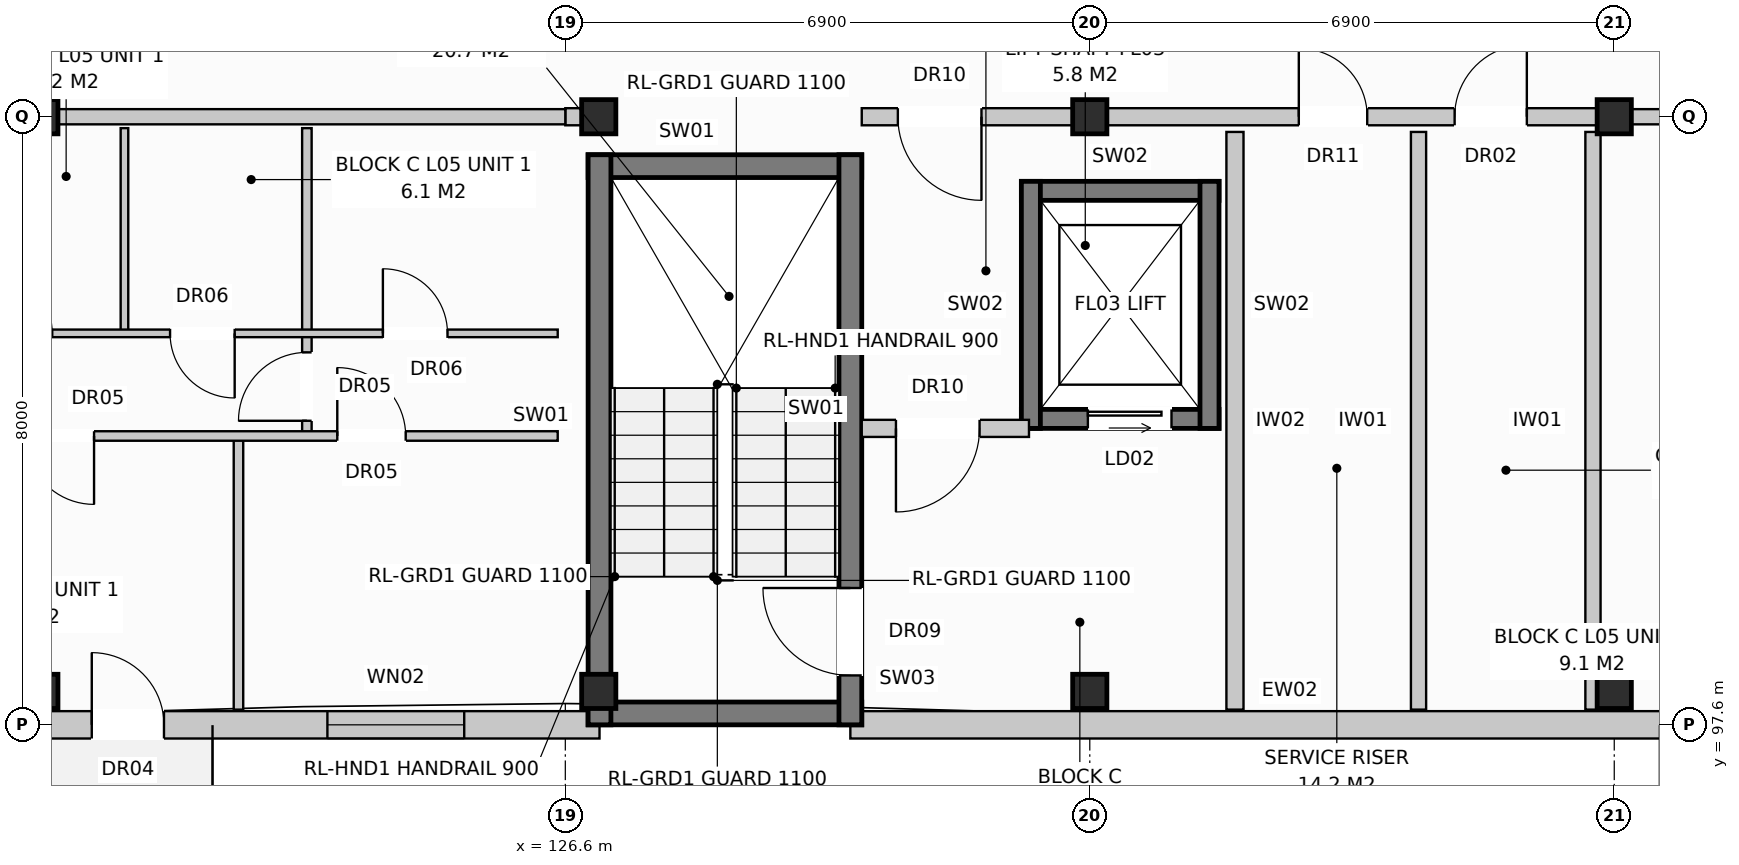
"""IFC4 building model, lengths in metres.
Left out: names, types, materials, properties, quantities, classifications, styles, units other than length and angle.
Written with IfcOpenShell. Run it as: python <this file> out.ifc"""

import sys

from ifc_helpers import new_model, si_unit, direction, frame, frame_2d, origin, origin_with_axes, origin_2d, place, context, subcontext, project, spatial, rectangle, extrude, element, fill, save


model = new_model("IFC4")
c1 = context("Model", 3, precision=1e-05, world=origin(), true_north=direction((0.0, 1.0)))
c2 = subcontext(c1, "Body", "Model", "MODEL_VIEW")
j1 = project(units=[si_unit("LENGTHUNIT", "METRE"), si_unit("PLANEANGLEUNIT", "RADIAN")], contexts=[c1])
p1 = place(None, origin())
s1 = spatial("IfcSite", under=j1, at=p1, CompositionType="ELEMENT")
p2 = place(p1, origin())
s2 = spatial("IfcBuilding", under=s1, at=p2, CompositionType="ELEMENT")
p3 = place(p2, frame((0.0, 0.0, 17.6)))
s3 = spatial("IfcBuildingStorey", under=s2, at=p3, CompositionType="ELEMENT", Elevation=17.6)
for number, where, z_axis, x_axis in (
    (1, (119.7, 98.04, 0.0), (0.0, 0.0, 1.0), (1.0, 0.0, 0.0)),
    (2, (119.7, 105.6, 0.0), (0.0, 0.0, 1.0), (1.0, 0.0, 0.0)),
    (3, (127.04, 98.04, 0.0), (0.0, 0.0, 1.0), (1.0, 0.0, 0.0)),
    (4, (127.04, 105.6, 0.0), (0.0, 0.0, 1.0), (1.0, 0.0, 0.0)),
    (5, (133.5, 98.04, 0.0), (0.0, 0.0, 1.0), (1.0, 0.0, 0.0)),
    (6, (133.5, 105.6, 0.0), (0.0, 0.0, 1.0), (1.0, 0.0, 0.0)),
    (7, (140.4, 98.04, 0.0), (0.0, 0.0, 1.0), (1.0, 0.0, 0.0)),
    (8, (140.4, 105.6, 0.0), (0.0, 0.0, 1.0), (1.0, 0.0, 0.0)),
):
    element("IfcColumn", number, at=place(p3, frame(where, z_axis=z_axis, x_axis=x_axis)), inside=s3, PredefinedType="COLUMN", context=c2, shape_type="SweptSolid", body=[
        extrude(rectangle(XDim=0.45, YDim=0.45, at=origin_2d()), origin(), (0.0, 0.0, 1.0), 3.2),
    ])
p4 = place(p3, frame((112.97, 97.6, 0.0), z_axis=(0.0, 0.0, 1.0), x_axis=(1.0, 0.0, 0.0)))
e9 = element("IfcWall", 9, at=p4, inside=s3, PredefinedType="STANDARD", context=c2, shape_type="SweptSolid", body=[
    extrude(rectangle(XDim=14.08, YDim=0.36, at=frame_2d((7.04, 0.0))), origin(), (0.0, 0.0, 1.0), 2.95),
])
p5 = place(p4, frame((7.4, 0.0, 0.0)))
e10 = element("IfcOpeningElement", 10, at=p5, cuts=e9, PredefinedType="OPENING", context=c2, shape_type="SweptSolid", body=[
    extrude(rectangle(XDim=0.95, YDim=2.1, at=frame_2d((0.475, 1.05))), frame((0.0, 0.192, 0.0), z_axis=(0.0, -1.0, 0.0), x_axis=(1.0, 0.0, 0.0)), (0.0, 0.0, 1.0), 0.384),
])
p6 = place(p4, frame((1.525, 0.0, 0.8)))
e11 = element("IfcOpeningElement", 11, at=p6, cuts=e9, PredefinedType="OPENING", context=c2, shape_type="SweptSolid", body=[
    extrude(rectangle(XDim=1.95, YDim=1.65, at=frame_2d((0.975, 0.825))), frame((0.0, 0.192, 0.0), z_axis=(0.0, -1.0, 0.0), x_axis=(1.0, 0.0, 0.0)), (0.0, 0.0, 1.0), 0.384),
])
p7 = place(p4, frame((10.5, 0.0, 0.8)))
e12 = element("IfcOpeningElement", 12, at=p7, cuts=e9, PredefinedType="OPENING", context=c2, shape_type="SweptSolid", body=[
    extrude(rectangle(XDim=1.8, YDim=1.7, at=frame_2d((0.9, 0.85))), frame((0.0, 0.192, 0.0), z_axis=(0.0, -1.0, 0.0), x_axis=(1.0, 0.0, 0.0)), (0.0, 0.0, 1.0), 0.384),
])
p8 = place(p3, frame((130.35, 97.6, 0.0), z_axis=(0.0, 0.0, 1.0), x_axis=(1.0, 0.0, 0.0)))
e13 = element("IfcWall", 13, at=p8, inside=s3, PredefinedType="STANDARD", context=c2, shape_type="SweptSolid", body=[
    extrude(rectangle(XDim=17.4, YDim=0.36, at=frame_2d((8.7, 0.0))), origin(), (0.0, 0.0, 1.0), 2.95),
])
p9 = place(p8, frame((11.87, 0.0, 0.0)))
e14 = element("IfcOpeningElement", 14, at=p9, cuts=e13, PredefinedType="OPENING", context=c2, shape_type="SweptSolid", body=[
    extrude(rectangle(XDim=0.95, YDim=2.1, at=frame_2d((0.475, 1.05))), frame((0.0, 0.192, 0.0), z_axis=(0.0, -1.0, 0.0), x_axis=(1.0, 0.0, 0.0)), (0.0, 0.0, 1.0), 0.384),
])
p10 = place(p8, frame((14.87, 0.0, 0.72)))
e15 = element("IfcOpeningElement", 15, at=p10, cuts=e13, PredefinedType="OPENING", context=c2, shape_type="SweptSolid", body=[
    extrude(rectangle(XDim=1.1, YDim=1.5, at=frame_2d((0.55, 0.75))), frame((0.0, 0.192, 0.0), z_axis=(0.0, -1.0, 0.0), x_axis=(1.0, 0.0, 0.0)), (0.0, 0.0, 1.0), 0.384),
])
for number, where, z_axis, x_axis in (
    (16, (126.9, 97.75, 0.0), (0.0, 0.0, 1.0), (1.0, 0.0, 0.0)),
    (17, (126.9, 104.95, 0.0), (0.0, 0.0, 1.0), (1.0, 0.0, 0.0)),
):
    element("IfcWall", number, at=place(p3, frame(where, z_axis=z_axis, x_axis=x_axis)), inside=s3, PredefinedType="SHEAR", context=c2, shape_type="SweptSolid", body=[
        extrude(rectangle(XDim=3.6, YDim=0.3, at=frame_2d((1.8, 0.0))), origin(), (0.0, 0.0, 1.0), 2.95),
    ])
p11 = place(p3, frame((127.05, 97.6, 0.0), z_axis=(0.0, 0.0, 1.0), x_axis=(0.0, 1.0, 0.0)))
e18 = element("IfcWall", 18, at=p11, inside=s3, PredefinedType="SHEAR", context=c2, shape_type="SweptSolid", body=[
    extrude(rectangle(XDim=7.5, YDim=0.3, at=frame_2d((3.75, 0.0))), origin(), (0.0, 0.0, 1.0), 2.95),
])
p12 = place(p3, frame((130.35, 97.6, 0.0), z_axis=(0.0, 0.0, 1.0), x_axis=(0.0, 1.0, 0.0)))
e19 = element("IfcWall", 19, at=p12, inside=s3, PredefinedType="SHEAR", context=c2, shape_type="SweptSolid", body=[
    extrude(rectangle(XDim=7.5, YDim=0.3, at=frame_2d((3.75, 0.0))), origin(), (0.0, 0.0, 1.0), 2.95),
])
p13 = place(p12, frame((0.65, 0.0, 0.0)))
e20 = element("IfcOpeningElement", 20, at=p13, cuts=e19, PredefinedType="OPENING", context=c2, shape_type="SweptSolid", body=[
    extrude(rectangle(XDim=1.15, YDim=2.15, at=frame_2d((0.575, 1.075))), frame((0.0, 0.162, 0.0), z_axis=(0.0, -1.0, 0.0), x_axis=(1.0, 0.0, 0.0)), (0.0, 0.0, 1.0), 0.324),
])
p14 = place(p3, frame((132.6, 101.625, 0.0), z_axis=(0.0, 0.0, 1.0), x_axis=(1.0, 0.0, 0.0)))
e21 = element("IfcWall", 21, at=p14, inside=s3, PredefinedType="SHEAR", context=c2, shape_type="SweptSolid", body=[
    extrude(rectangle(XDim=2.6, YDim=0.25, at=frame_2d((1.3, 0.0))), origin(), (0.0, 0.0, 1.0), 2.95),
])
p15 = place(p14, frame((0.875, 0.0, 0.0)))
e22 = element("IfcOpeningElement", 22, at=p15, cuts=e21, PredefinedType="OPENING", context=c2, shape_type="SweptSolid", body=[
    extrude(rectangle(XDim=1.1, YDim=2.1, at=frame_2d((0.55, 1.05))), frame((0.0, 0.137, 0.0), z_axis=(0.0, -1.0, 0.0), x_axis=(1.0, 0.0, 0.0)), (0.0, 0.0, 1.0), 0.274),
])
p16 = place(p3, frame((132.6, 104.625, 0.0), z_axis=(0.0, 0.0, 1.0), x_axis=(1.0, 0.0, 0.0)))
e23 = element("IfcWall", 23, at=p16, inside=s3, PredefinedType="SHEAR", context=c2, shape_type="SweptSolid", body=[
    extrude(rectangle(XDim=2.6, YDim=0.25, at=frame_2d((1.3, 0.0))), origin(), (0.0, 0.0, 1.0), 2.95),
])
for number, where, z_axis, x_axis in (
    (24, (132.725, 101.5, 0.0), (0.0, 0.0, 1.0), (0.0, 1.0, 0.0)),
    (25, (135.075, 101.5, 0.0), (0.0, 0.0, 1.0), (0.0, 1.0, 0.0)),
):
    element("IfcWall", number, at=place(p3, frame(where, z_axis=z_axis, x_axis=x_axis)), inside=s3, PredefinedType="SHEAR", context=c2, shape_type="SweptSolid", body=[
        extrude(rectangle(XDim=3.25, YDim=0.25, at=frame_2d((1.625, 0.0))), origin(), (0.0, 0.0, 1.0), 2.95),
    ])
p17 = place(p3, frame((135.41, 97.8, 0.0), z_axis=(0.0, 0.0, 1.0), x_axis=(0.0, 1.0, 0.0)))
e26 = element("IfcWall", 26, at=p17, inside=s3, PredefinedType="PARTITIONING", context=c2, shape_type="SweptSolid", body=[
    extrude(rectangle(XDim=7.6, YDim=0.225, at=frame_2d((3.8, 0.0))), origin(), (0.0, 0.0, 1.0), 2.59),
])
p18 = place(p3, frame((130.5, 101.5, 0.0), z_axis=(0.0, 0.0, 1.0), x_axis=(1.0, 0.0, 0.0)))
e27 = element("IfcWall", 27, at=p18, inside=s3, PredefinedType="PARTITIONING", context=c2, shape_type="SweptSolid", body=[
    extrude(rectangle(XDim=2.2, YDim=0.225, at=frame_2d((1.1, 0.0))), origin(), (0.0, 0.0, 1.0), 2.95),
])
p19 = place(p18, frame((0.45, 0.0, 0.0)))
e28 = element("IfcOpeningElement", 28, at=p19, cuts=e27, PredefinedType="OPENING", context=c2, shape_type="SweptSolid", body=[
    extrude(rectangle(XDim=1.1, YDim=2.15, at=frame_2d((0.55, 1.075))), frame((0.0, 0.125, 0.0), z_axis=(0.0, -1.0, 0.0), x_axis=(1.0, 0.0, 0.0)), (0.0, 0.0, 1.0), 0.249),
])
p20 = place(p3, frame((126.6, 105.6, 0.0), z_axis=(0.0, 0.0, 1.0), x_axis=(1.0, 0.0, 0.0)))
e29 = element("IfcWall", 29, at=p20, inside=s3, PredefinedType="PARTITIONING", context=c2, shape_type="SweptSolid", body=[
    extrude(rectangle(XDim=0.3, YDim=0.225, at=frame_2d((0.15, 0.0))), origin(), (0.0, 0.0, 1.0), 2.95),
])
for number, where, z_axis, x_axis in (
    (30, (137.825, 97.8, 0.0), (0.0, 0.0, 1.0), (0.0, 1.0, 0.0)),
    (31, (140.12, 97.8, 0.0), (0.0, 0.0, 1.0), (0.0, 1.0, 0.0)),
):
    element("IfcWall", number, at=place(p3, frame(where, z_axis=z_axis, x_axis=x_axis)), inside=s3, PredefinedType="PARTITIONING", context=c2, shape_type="SweptSolid", body=[
        extrude(rectangle(XDim=7.6, YDim=0.2, at=frame_2d((3.8, 0.0))), origin(), (0.0, 0.0, 1.0), 2.95),
    ])
p21 = place(p3, frame((130.5, 105.6, 0.0), z_axis=(0.0, 0.0, 1.0), x_axis=(1.0, 0.0, 0.0)))
e32 = element("IfcWall", 32, at=p21, inside=s3, PredefinedType="PARTITIONING", context=c2, shape_type="SweptSolid", body=[
    extrude(rectangle(XDim=9.9, YDim=0.225, at=frame_2d((4.95, 0.0))), origin(), (0.0, 0.0, 1.0), 2.39),
])
p22 = place(p21, frame((0.475, 0.0, 0.0)))
e33 = element("IfcOpeningElement", 33, at=p22, cuts=e32, PredefinedType="OPENING", context=c2, shape_type="SweptSolid", body=[
    extrude(rectangle(XDim=1.1, YDim=2.15, at=frame_2d((0.55, 1.075))), frame((0.0, 0.125, 0.0), z_axis=(0.0, -1.0, 0.0), x_axis=(1.0, 0.0, 0.0)), (0.0, 0.0, 1.0), 0.249),
])
p23 = place(p21, frame((5.75, 0.0, 0.0)))
e34 = element("IfcOpeningElement", 34, at=p23, cuts=e32, PredefinedType="OPENING", context=c2, shape_type="SweptSolid", body=[
    extrude(rectangle(XDim=0.9, YDim=2.1, at=frame_2d((0.45, 1.05))), frame((0.0, 0.125, 0.0), z_axis=(0.0, -1.0, 0.0), x_axis=(1.0, 0.0, 0.0)), (0.0, 0.0, 1.0), 0.249),
])
p24 = place(p21, frame((7.8, 0.0, 0.0)))
e35 = element("IfcOpeningElement", 35, at=p24, cuts=e32, PredefinedType="OPENING", context=c2, shape_type="SweptSolid", body=[
    extrude(rectangle(XDim=0.95, YDim=2.15, at=frame_2d((0.475, 1.075))), frame((0.0, 0.125, 0.0), z_axis=(0.0, -1.0, 0.0), x_axis=(1.0, 0.0, 0.0)), (0.0, 0.0, 1.0), 0.249),
])
p25 = place(p3, frame((112.8, 105.6, 0.0), z_axis=(0.0, 0.0, 1.0), x_axis=(1.0, 0.0, 0.0)))
e36 = element("IfcWall", 36, at=p25, inside=s3, PredefinedType="PARTITIONING", context=c2, shape_type="SweptSolid", body=[
    extrude(rectangle(XDim=13.8, YDim=0.2, at=frame_2d((6.9, 0.0))), origin(), (0.0, 0.0, 1.0), 2.39),
])
p26 = place(p25, frame((2.4, 0.0, 0.0)))
e37 = element("IfcOpeningElement", 37, at=p26, cuts=e36, PredefinedType="OPENING", context=c2, shape_type="SweptSolid", body=[
    extrude(rectangle(XDim=0.95, YDim=2.15, at=frame_2d((0.475, 1.075))), frame((0.0, 0.112, 0.0), z_axis=(0.0, -1.0, 0.0), x_axis=(1.0, 0.0, 0.0)), (0.0, 0.0, 1.0), 0.224),
])
p27 = place(p3, frame((120.8, 105.45, 0.0), z_axis=(0.0, 0.0, 1.0), x_axis=(0.0, -1.0, 0.0)))
e38 = element("IfcWall", 38, at=p27, inside=s3, PredefinedType="PARTITIONING", context=c2, shape_type="SweptSolid", body=[
    extrude(rectangle(XDim=2.7, YDim=0.1, at=frame_2d((1.35, 0.0))), origin(), (0.0, 0.0, 1.0), 2.59),
])
p28 = place(p3, frame((123.2, 105.45, 0.0), z_axis=(0.0, 0.0, 1.0), x_axis=(0.0, -1.0, 0.0)))
e39 = element("IfcWall", 39, at=p28, inside=s3, PredefinedType="PARTITIONING", context=c2, shape_type="SweptSolid", body=[
    extrude(rectangle(XDim=4.05, YDim=0.125, at=frame_2d((2.025, 0.0))), origin(), (0.0, 0.0, 1.0), 2.95),
])
p29 = place(p28, frame((2.95, 0.0, 0.0)))
e40 = element("IfcOpeningElement", 40, at=p29, cuts=e39, PredefinedType="OPENING", context=c2, shape_type="SweptSolid", body=[
    extrude(rectangle(XDim=0.9, YDim=2.1, at=frame_2d((0.45, 1.05))), frame((0.0, 0.074, 0.0), z_axis=(0.0, -1.0, 0.0), x_axis=(1.0, 0.0, 0.0)), (0.0, 0.0, 1.0), 0.149),
])
p30 = place(p3, frame((122.3, 101.4, 0.0), z_axis=(0.0, 0.0, 1.0), x_axis=(0.0, -1.0, 0.0)))
e41 = element("IfcWall", 41, at=p30, inside=s3, PredefinedType="PARTITIONING", context=c2, shape_type="SweptSolid", body=[
    extrude(rectangle(XDim=3.6, YDim=0.125, at=frame_2d((1.8, 0.0))), origin(), (0.0, 0.0, 1.0), 2.95),
])
p31 = place(p3, frame((118.0, 102.75, 0.0), z_axis=(0.0, 0.0, 1.0), x_axis=(1.0, 0.0, 0.0)))
e42 = element("IfcWall", 42, at=p31, inside=s3, PredefinedType="PARTITIONING", context=c2, shape_type="SweptSolid", body=[
    extrude(rectangle(XDim=8.5, YDim=0.1, at=frame_2d((4.25, 0.0))), origin(), (0.0, 0.0, 1.0), 2.95),
])
p32 = place(p31, frame((1.0, 0.0, 0.0)))
e43 = element("IfcOpeningElement", 43, at=p32, cuts=e42, PredefinedType="OPENING", context=c2, shape_type="SweptSolid", body=[
    extrude(rectangle(XDim=0.85, YDim=2.1, at=frame_2d((0.425, 1.05))), frame((0.0, 0.062, 0.0), z_axis=(0.0, -1.0, 0.0), x_axis=(1.0, 0.0, 0.0)), (0.0, 0.0, 1.0), 0.124),
])
p33 = place(p31, frame((3.4, 0.0, 0.0)))
e44 = element("IfcOpeningElement", 44, at=p33, cuts=e42, PredefinedType="OPENING", context=c2, shape_type="SweptSolid", body=[
    extrude(rectangle(XDim=0.85, YDim=2.05, at=frame_2d((0.425, 1.025))), frame((0.0, 0.062, 0.0), z_axis=(0.0, -1.0, 0.0), x_axis=(1.0, 0.0, 0.0)), (0.0, 0.0, 1.0), 0.124),
])
p34 = place(p31, frame((6.2, 0.0, 0.0)))
e45 = element("IfcOpeningElement", 45, at=p34, cuts=e42, PredefinedType="OPENING", context=c2, shape_type="SweptSolid", body=[
    extrude(rectangle(XDim=0.85, YDim=2.05, at=frame_2d((0.425, 1.025))), frame((0.0, 0.062, 0.0), z_axis=(0.0, -1.0, 0.0), x_axis=(1.0, 0.0, 0.0)), (0.0, 0.0, 1.0), 0.124),
])
p35 = place(p3, frame((118.0, 101.4, 0.0), z_axis=(0.0, 0.0, 1.0), x_axis=(1.0, 0.0, 0.0)))
e46 = element("IfcWall", 46, at=p35, inside=s3, PredefinedType="PARTITIONING", context=c2, shape_type="SweptSolid", body=[
    extrude(rectangle(XDim=8.5, YDim=0.125, at=frame_2d((4.25, 0.0))), origin(), (0.0, 0.0, 1.0), 2.95),
])
p36 = place(p35, frame((1.5, 0.0, 0.0)))
e47 = element("IfcOpeningElement", 47, at=p36, cuts=e46, PredefinedType="OPENING", context=c2, shape_type="SweptSolid", body=[
    extrude(rectangle(XDim=0.9, YDim=2.1, at=frame_2d((0.45, 1.05))), frame((0.0, 0.074, 0.0), z_axis=(0.0, -1.0, 0.0), x_axis=(1.0, 0.0, 0.0)), (0.0, 0.0, 1.0), 0.149),
])
p37 = place(p35, frame((5.6, 0.0, 0.0)))
e48 = element("IfcOpeningElement", 48, at=p37, cuts=e46, PredefinedType="OPENING", context=c2, shape_type="SweptSolid", body=[
    extrude(rectangle(XDim=0.9, YDim=2.1, at=frame_2d((0.45, 1.05))), frame((0.0, 0.074, 0.0), z_axis=(0.0, -1.0, 0.0), x_axis=(1.0, 0.0, 0.0)), (0.0, 0.0, 1.0), 0.149),
])
p38 = place(p3, frame((140.4, 105.6, 0.0), z_axis=(0.0, 0.0, 1.0), x_axis=(1.0, 0.0, 0.0)))
e49 = element("IfcWall", 49, at=p38, inside=s3, PredefinedType="PARTITIONING", context=c2, shape_type="SweptSolid", body=[
    extrude(rectangle(XDim=6.9, YDim=0.2, at=frame_2d((3.45, 0.0))), origin(), (0.0, 0.0, 1.0), 2.39),
])
p39 = place(p38, frame((2.0, 0.0, 0.0)))
e50 = element("IfcOpeningElement", 50, at=p39, cuts=e49, PredefinedType="OPENING", context=c2, shape_type="SweptSolid", body=[
    extrude(rectangle(XDim=0.95, YDim=2.15, at=frame_2d((0.475, 1.075))), frame((0.0, 0.112, 0.0), z_axis=(0.0, -1.0, 0.0), x_axis=(1.0, 0.0, 0.0)), (0.0, 0.0, 1.0), 0.224),
])
p40 = place(p5, origin_with_axes())
e51 = element("IfcDoor", 51, at=p40, inside=s3, OperationType="SINGLE_SWING_LEFT", PredefinedType="DOOR", context=c2, shape_type="SweptSolid", body=[
    extrude(rectangle(XDim=0.95, YDim=2.1, at=frame_2d((0.475, 1.05))), frame((0.0, 0.025, 0.0), z_axis=(0.0, -1.0, 0.0), x_axis=(1.0, 0.0, 0.0)), (0.0, 0.0, 1.0), 0.05),
])
fill(e10, e51)
p41 = place(p7, origin_with_axes())
e52 = element("IfcWindow", 52, at=p41, inside=s3, PartitioningType="SINGLE_PANEL", PredefinedType="WINDOW", context=c2, shape_type="SweptSolid", body=[
    extrude(rectangle(XDim=1.8, YDim=1.7, at=frame_2d((0.9, 0.85))), frame((0.0, 0.03, 0.0), z_axis=(0.0, -1.0, 0.0), x_axis=(1.0, 0.0, 0.0)), (0.0, 0.0, 1.0), 0.06),
])
fill(e12, e52)
p42 = place(p13, origin_with_axes())
e53 = element("IfcDoor", 53, at=p42, inside=s3, OperationType="SINGLE_SWING_RIGHT", PredefinedType="DOOR", context=c2, shape_type="SweptSolid", body=[
    extrude(rectangle(XDim=1.15, YDim=2.15, at=frame_2d((0.575, 1.075))), frame((0.0, 0.025, 0.0), z_axis=(0.0, -1.0, 0.0), x_axis=(1.0, 0.0, 0.0)), (0.0, 0.0, 1.0), 0.05),
])
fill(e20, e53)
p43 = place(p15, origin_with_axes())
e54 = element("IfcDoor", 54, at=p43, inside=s3, OperationType="SLIDING_TO_LEFT", PredefinedType="DOOR", context=c2, shape_type="SweptSolid", body=[
    extrude(rectangle(XDim=1.1, YDim=2.1, at=frame_2d((0.55, 1.05))), frame((0.0, 0.025, 0.0), z_axis=(0.0, -1.0, 0.0), x_axis=(1.0, 0.0, 0.0)), (0.0, 0.0, 1.0), 0.05),
])
fill(e22, e54)
p44 = place(p19, frame((1.1, 0.0, 0.0), z_axis=(0.0, 0.0, 1.0), x_axis=(-1.0, 0.0, 0.0)))
e55 = element("IfcDoor", 55, at=p44, inside=s3, OperationType="SINGLE_SWING_LEFT", PredefinedType="DOOR", context=c2, shape_type="SweptSolid", body=[
    extrude(rectangle(XDim=1.1, YDim=2.15, at=frame_2d((0.55, 1.075))), frame((0.0, 0.025, 0.0), z_axis=(0.0, -1.0, 0.0), x_axis=(1.0, 0.0, 0.0)), (0.0, 0.0, 1.0), 0.05),
])
fill(e28, e55)
p45 = place(p22, frame((1.1, 0.0, 0.0), z_axis=(0.0, 0.0, 1.0), x_axis=(-1.0, 0.0, 0.0)))
e56 = element("IfcDoor", 56, at=p45, inside=s3, OperationType="SINGLE_SWING_RIGHT", PredefinedType="DOOR", context=c2, shape_type="SweptSolid", body=[
    extrude(rectangle(XDim=1.1, YDim=2.15, at=frame_2d((0.55, 1.075))), frame((0.0, 0.025, 0.0), z_axis=(0.0, -1.0, 0.0), x_axis=(1.0, 0.0, 0.0)), (0.0, 0.0, 1.0), 0.05),
])
fill(e33, e56)
p46 = place(p23, origin_with_axes())
e57 = element("IfcDoor", 57, at=p46, inside=s3, OperationType="SINGLE_SWING_LEFT", PredefinedType="DOOR", context=c2, shape_type="SweptSolid", body=[
    extrude(rectangle(XDim=0.9, YDim=2.1, at=frame_2d((0.45, 1.05))), frame((0.0, 0.025, 0.0), z_axis=(0.0, -1.0, 0.0), x_axis=(1.0, 0.0, 0.0)), (0.0, 0.0, 1.0), 0.05),
])
fill(e34, e57)
p47 = place(p24, origin_with_axes())
e58 = element("IfcDoor", 58, at=p47, inside=s3, OperationType="SINGLE_SWING_RIGHT", PredefinedType="DOOR", context=c2, shape_type="SweptSolid", body=[
    extrude(rectangle(XDim=0.95, YDim=2.15, at=frame_2d((0.475, 1.075))), frame((0.0, 0.025, 0.0), z_axis=(0.0, -1.0, 0.0), x_axis=(1.0, 0.0, 0.0)), (0.0, 0.0, 1.0), 0.05),
])
fill(e35, e58)
p48 = place(p29, frame((0.9, 0.0, 0.0), z_axis=(0.0, 0.0, 1.0), x_axis=(-1.0, 0.0, 0.0)))
e59 = element("IfcDoor", 59, at=p48, inside=s3, OperationType="SINGLE_SWING_RIGHT", PredefinedType="DOOR", context=c2, shape_type="SweptSolid", body=[
    extrude(rectangle(XDim=0.9, YDim=2.1, at=frame_2d((0.45, 1.05))), frame((0.0, 0.025, 0.0), z_axis=(0.0, -1.0, 0.0), x_axis=(1.0, 0.0, 0.0)), (0.0, 0.0, 1.0), 0.05),
])
fill(e40, e59)
p49 = place(p33, frame((0.85, 0.0, 0.0), z_axis=(0.0, 0.0, 1.0), x_axis=(-1.0, 0.0, 0.0)))
e60 = element("IfcDoor", 60, at=p49, inside=s3, OperationType="SINGLE_SWING_RIGHT", PredefinedType="DOOR", context=c2, shape_type="SweptSolid", body=[
    extrude(rectangle(XDim=0.85, YDim=2.05, at=frame_2d((0.425, 1.025))), frame((0.0, 0.025, 0.0), z_axis=(0.0, -1.0, 0.0), x_axis=(1.0, 0.0, 0.0)), (0.0, 0.0, 1.0), 0.05),
])
fill(e44, e60)
p50 = place(p34, origin_with_axes())
e61 = element("IfcDoor", 61, at=p50, inside=s3, OperationType="SINGLE_SWING_LEFT", PredefinedType="DOOR", context=c2, shape_type="SweptSolid", body=[
    extrude(rectangle(XDim=0.85, YDim=2.05, at=frame_2d((0.425, 1.025))), frame((0.0, 0.025, 0.0), z_axis=(0.0, -1.0, 0.0), x_axis=(1.0, 0.0, 0.0)), (0.0, 0.0, 1.0), 0.05),
])
fill(e45, e61)
p51 = place(p36, frame((0.9, 0.0, 0.0), z_axis=(0.0, 0.0, 1.0), x_axis=(-1.0, 0.0, 0.0)))
e62 = element("IfcDoor", 62, at=p51, inside=s3, OperationType="SINGLE_SWING_RIGHT", PredefinedType="DOOR", context=c2, shape_type="SweptSolid", body=[
    extrude(rectangle(XDim=0.9, YDim=2.1, at=frame_2d((0.45, 1.05))), frame((0.0, 0.025, 0.0), z_axis=(0.0, -1.0, 0.0), x_axis=(1.0, 0.0, 0.0)), (0.0, 0.0, 1.0), 0.05),
])
fill(e47, e62)
p52 = place(p37, origin_with_axes())
e63 = element("IfcDoor", 63, at=p52, inside=s3, OperationType="SINGLE_SWING_LEFT", PredefinedType="DOOR", context=c2, shape_type="SweptSolid", body=[
    extrude(rectangle(XDim=0.9, YDim=2.1, at=frame_2d((0.45, 1.05))), frame((0.0, 0.025, 0.0), z_axis=(0.0, -1.0, 0.0), x_axis=(1.0, 0.0, 0.0)), (0.0, 0.0, 1.0), 0.05),
])
fill(e48, e63)
save(model, sys.argv[1])
